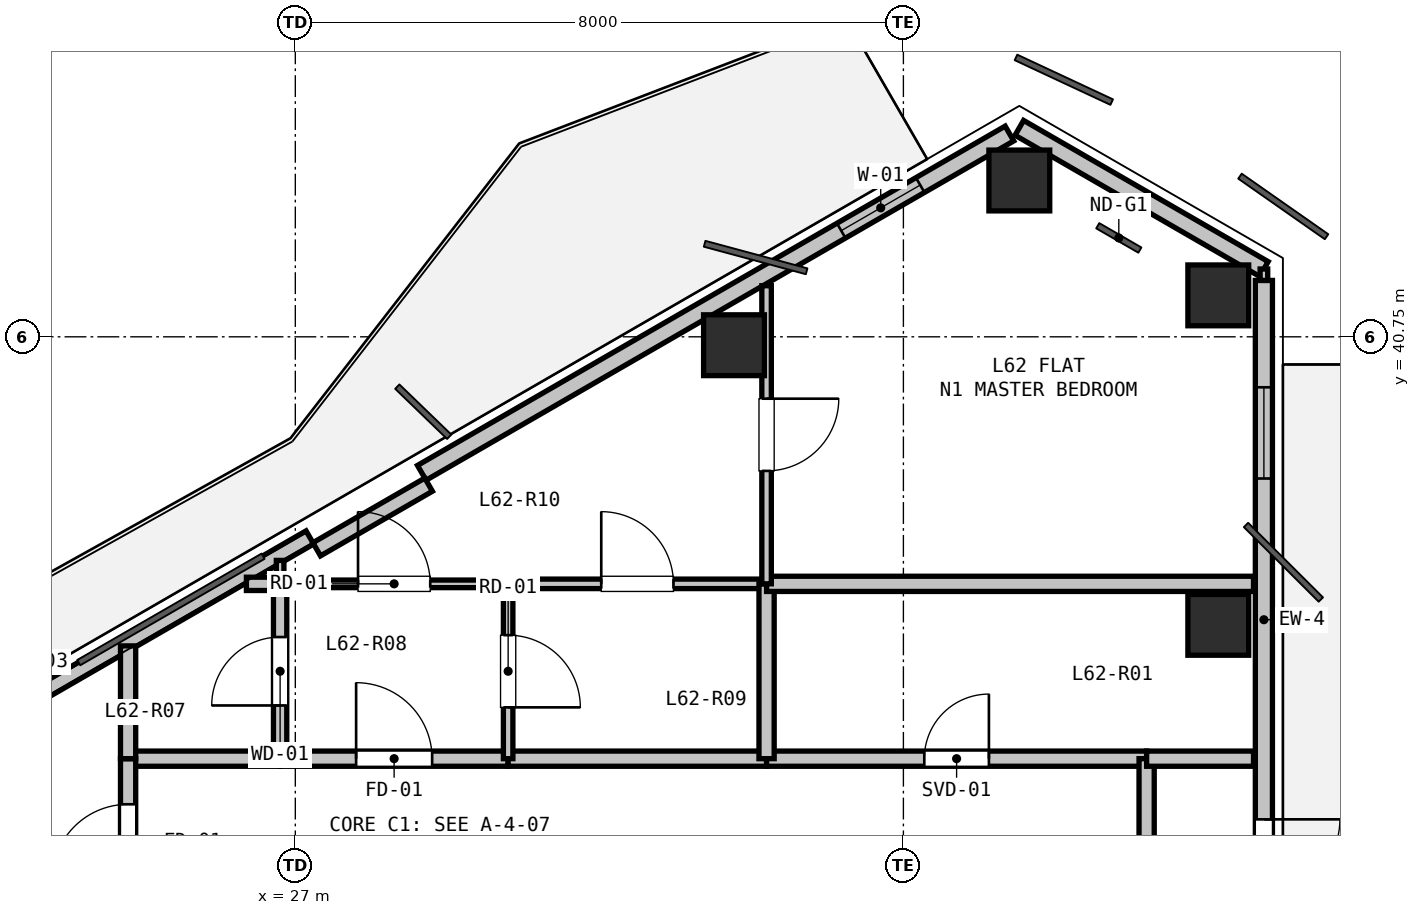
"""IFC4 building model, lengths in metres.
Left out: names, types, materials, properties, quantities, classifications, styles, units other than length and angle.
Written with IfcOpenShell. Run it as: python <this file> out.ifc"""

import sys

from ifc_helpers import new_model, si_unit, direction, frame, frame_2d, origin, origin_2d, place, context, subcontext, project, spatial, rectangle, hollow_rectangle, extrude, element, fill, save


model = new_model("IFC4")
c1 = context("Model", 3, precision=1e-05, world=origin(), true_north=direction((0.0, 1.0)))
c2 = subcontext(c1, "Body", "Model", "MODEL_VIEW")
j1 = project(units=[si_unit("LENGTHUNIT", "METRE"), si_unit("PLANEANGLEUNIT", "RADIAN")], contexts=[c1])
p1 = place(None, origin())
s1 = spatial("IfcSite", under=j1, at=p1, CompositionType="ELEMENT")
p2 = place(p1, origin())
s2 = spatial("IfcBuilding", under=s1, at=p2, CompositionType="ELEMENT")
p3 = place(p2, frame((0.0, 0.0, 223.2)))
s3 = spatial("IfcBuildingStorey", under=s2, at=p3, CompositionType="ELEMENT", Elevation=223.2)
for number, where, z_axis, x_axis in (
    (1, (32.771, 40.639, -0.22), (0.0, 0.0, 1.0), (1.0, 0.0, 0.0)),
    (2, (36.525, 42.807, -0.22), (0.0, 0.0, 1.0), (1.0, 0.0, 0.0)),
    (3, (39.143, 41.295, -0.22), (0.0, 0.0, 1.0), (1.0, 0.0, 0.0)),
    (4, (39.143, 36.961, -0.22), (0.0, 0.0, 1.0), (1.0, 0.0, 0.0)),
):
    element("IfcColumn", number, at=place(p3, frame(where, z_axis=z_axis, x_axis=x_axis)), inside=s3, PredefinedType="COLUMN", context=c2, shape_type="SweptSolid", body=[
        extrude(hollow_rectangle(XDim=0.8, YDim=0.8, WallThickness=0.025, at=origin_2d()), origin(), (0.0, 0.0, 1.0), 3.52),
    ])
p4 = place(p3, frame((36.525, 43.5, 0.0), z_axis=(0.0, 0.0, 1.0), x_axis=(0.866038962515, -0.499976514854, 0.0)))
e5 = element("IfcWall", 5, at=p4, inside=s3, PredefinedType="SOLIDWALL", context=c2, shape_type="SweptSolid", body=[
    extrude(rectangle(XDim=3.716, YDim=0.225, at=frame_2d((1.858, 0.0))), origin(), (0.0, 0.0, 1.0), 2.7),
])
p5 = place(p3, frame((20.066, 33.997, 0.0), z_axis=(0.0, 0.0, 1.0), x_axis=(0.866019557082, 0.500010126649, 0.0)))
e6 = element("IfcWall", 6, at=p5, inside=s3, PredefinedType="PARAPET", context=c2, shape_type="SweptSolid", body=[
    extrude(rectangle(XDim=8.228, YDim=0.2, at=frame_2d((4.114, 0.0))), origin(), (0.0, 0.0, 1.0), 0.2),
])
p6 = place(p3, frame((28.664, 38.96, 0.0), z_axis=(0.0, 0.0, 1.0), x_axis=(0.866026655105, 0.499997832642, 0.0)))
e7 = element("IfcWall", 7, at=p6, inside=s3, PredefinedType="SOLIDWALL", context=c2, shape_type="SweptSolid", body=[
    extrude(rectangle(XDim=8.928, YDim=0.225, at=frame_2d((4.464, 0.0))), origin(), (0.0, 0.0, 1.0), 2.7),
])
p7 = place(p6, frame((6.372, 0.0, 0.9)))
e8 = element("IfcOpeningElement", 8, at=p7, cuts=e7, PredefinedType="OPENING", context=c2, shape_type="SweptSolid", body=[
    extrude(rectangle(XDim=1.2, YDim=1.4, at=frame_2d((0.6, 0.7))), frame((0.0, 0.123, 0.0), z_axis=(0.0, -1.0, 0.0), x_axis=(1.0, 0.0, 0.0)), (0.0, 0.0, 1.0), 0.245),
])
p8 = place(p3, frame((27.281, 37.955, 0.0), z_axis=(0.0, 0.0, 1.0), x_axis=(0.866025371046, 0.500000056704, 0.0)))
e9 = element("IfcWall", 9, at=p8, inside=s3, PredefinedType="PARAPET", context=c2, shape_type="SweptSolid", body=[
    extrude(rectangle(XDim=1.7, YDim=0.2, at=frame_2d((0.85, 0.0))), origin(), (0.0, 0.0, 1.0), 2.7),
])
p9 = place(p3, frame((39.743, 41.492, 0.0), z_axis=(0.0, 0.0, 1.0), x_axis=(0.0, -1.0, 0.0)))
e10 = element("IfcWall", 10, at=p9, inside=s3, PredefinedType="SOLIDWALL", context=c2, shape_type="SweptSolid", body=[
    extrude(rectangle(XDim=8.928, YDim=0.225, at=frame_2d((4.464, 0.0))), origin(), (0.0, 0.0, 1.0), 2.7),
])
p10 = place(p9, frame((7.09, 0.0, 0.0)))
e11 = element("IfcOpeningElement", 11, at=p10, cuts=e10, PredefinedType="OPENING", context=c2, shape_type="SweptSolid", body=[
    extrude(rectangle(XDim=1.0, YDim=2.1, at=frame_2d((0.5, 1.05))), frame((0.0, 0.123, 0.0), z_axis=(0.0, -1.0, 0.0), x_axis=(1.0, 0.0, 0.0)), (0.0, 0.0, 1.0), 0.245),
])
p11 = place(p9, frame((1.406, 0.0, 0.9)))
e12 = element("IfcOpeningElement", 12, at=p11, cuts=e10, PredefinedType="OPENING", context=c2, shape_type="SweptSolid", body=[
    extrude(rectangle(XDim=1.2, YDim=1.4, at=frame_2d((0.6, 0.7))), frame((0.0, 0.123, 0.0), z_axis=(0.0, -1.0, 0.0), x_axis=(1.0, 0.0, 0.0)), (0.0, 0.0, 1.0), 0.245),
])
p12 = place(p3, frame((24.8, 35.2, 0.0), z_axis=(0.0, 0.0, 1.0), x_axis=(1.0, 0.0, 0.0)))
e13 = element("IfcWall", 13, at=p12, inside=s3, PredefinedType="PARTITIONING", context=c2, shape_type="SweptSolid", body=[
    extrude(rectangle(XDim=2.0, YDim=0.2, at=frame_2d((1.0, 0.0))), origin(), (0.0, 0.0, 1.0), 3.08),
])
p13 = place(p3, frame((26.8, 35.2, 0.0), z_axis=(0.0, 0.0, 1.0), x_axis=(1.0, 0.0, 0.0)))
e14 = element("IfcWall", 14, at=p13, inside=s3, PredefinedType="PARTITIONING", context=c2, shape_type="SweptSolid", body=[
    extrude(rectangle(XDim=3.0, YDim=0.2, at=frame_2d((1.5, 0.0))), origin(), (0.0, 0.0, 1.0), 3.08),
])
p14 = place(p13, frame((1.0, 0.0, 0.0)))
e15 = element("IfcOpeningElement", 15, at=p14, cuts=e14, PredefinedType="OPENING", context=c2, shape_type="SweptSolid", body=[
    extrude(rectangle(XDim=1.0, YDim=2.15, at=frame_2d((0.5, 1.075))), frame((0.0, 0.11, 0.0), z_axis=(0.0, -1.0, 0.0), x_axis=(1.0, 0.0, 0.0)), (0.0, 0.0, 1.0), 0.22),
])
p15 = place(p3, frame((29.8, 35.2, 0.0), z_axis=(0.0, 0.0, 1.0), x_axis=(1.0, 0.0, 0.0)))
e16 = element("IfcWall", 16, at=p15, inside=s3, PredefinedType="PARTITIONING", context=c2, shape_type="SweptSolid", body=[
    extrude(rectangle(XDim=3.4, YDim=0.2, at=frame_2d((1.7, 0.0))), origin(), (0.0, 0.0, 1.0), 3.08),
])
p16 = place(p3, frame((33.2, 35.2, 0.0), z_axis=(0.0, 0.0, 1.0), x_axis=(1.0, 0.0, 0.0)))
e17 = element("IfcWall", 17, at=p16, inside=s3, PredefinedType="PARTITIONING", context=c2, shape_type="SweptSolid", body=[
    extrude(rectangle(XDim=5.0, YDim=0.2, at=frame_2d((2.5, 0.0))), origin(), (0.0, 0.0, 1.0), 2.528),
])
p17 = place(p16, frame((2.075, 0.0, 0.0)))
e18 = element("IfcOpeningElement", 18, at=p17, cuts=e17, PredefinedType="OPENING", context=c2, shape_type="SweptSolid", body=[
    extrude(rectangle(XDim=0.85, YDim=2.1, at=frame_2d((0.425, 1.05))), frame((0.0, 0.11, 0.0), z_axis=(0.0, -1.0, 0.0), x_axis=(1.0, 0.0, 0.0)), (0.0, 0.0, 1.0), 0.22),
])
p18 = place(p3, frame((38.2, 35.2, 0.0), z_axis=(0.0, 0.0, 1.0), x_axis=(0.0, -1.0, 0.0)))
e19 = element("IfcWall", 19, at=p18, inside=s3, PredefinedType="PARTITIONING", context=c2, shape_type="SweptSolid", body=[
    extrude(rectangle(XDim=2.45, YDim=0.2, at=frame_2d((1.225, 0.0))), origin(), (0.0, 0.0, 1.0), 3.08),
])
p19 = place(p3, frame((24.8, 33.0, 0.0), z_axis=(0.0, 0.0, 1.0), x_axis=(0.0, 1.0, 0.0)))
e20 = element("IfcWall", 20, at=p19, inside=s3, PredefinedType="PARTITIONING", context=c2, shape_type="SweptSolid", body=[
    extrude(rectangle(XDim=2.2, YDim=0.2, at=frame_2d((1.1, 0.0))), origin(), (0.0, 0.0, 1.0), 2.605),
])
p20 = place(p19, frame((0.6, 0.0, 0.0)))
e21 = element("IfcOpeningElement", 21, at=p20, cuts=e20, PredefinedType="OPENING", context=c2, shape_type="SweptSolid", body=[
    extrude(rectangle(XDim=1.0, YDim=2.15, at=frame_2d((0.5, 1.075))), frame((0.0, 0.11, 0.0), z_axis=(0.0, -1.0, 0.0), x_axis=(1.0, 0.0, 0.0)), (0.0, 0.0, 1.0), 0.22),
])
p21 = place(p3, frame((26.8, 37.5, 0.0), z_axis=(0.0, 0.0, 1.0), x_axis=(1.0, 0.0, 0.0)))
e22 = element("IfcWall", 22, at=p21, inside=s3, PredefinedType="PARTITIONING", context=c2, shape_type="SweptSolid", body=[
    extrude(rectangle(XDim=3.0, YDim=0.1, at=frame_2d((1.5, 0.0))), origin(), (0.0, 0.0, 1.0), 2.365),
])
p22 = place(p21, frame((1.025, 0.0, 0.0)))
e23 = element("IfcOpeningElement", 23, at=p22, cuts=e22, PredefinedType="OPENING", context=c2, shape_type="SweptSolid", body=[
    extrude(rectangle(XDim=0.95, YDim=2.1, at=frame_2d((0.475, 1.05))), frame((0.0, 0.06, 0.0), z_axis=(0.0, -1.0, 0.0), x_axis=(1.0, 0.0, 0.0)), (0.0, 0.0, 1.0), 0.12),
])
p23 = place(p3, frame((29.8, 37.5, 0.0), z_axis=(0.0, 0.0, 1.0), x_axis=(0.0, -1.0, 0.0)))
e24 = element("IfcWall", 24, at=p23, inside=s3, PredefinedType="PARTITIONING", context=c2, shape_type="SweptSolid", body=[
    extrude(rectangle(XDim=2.3, YDim=0.125, at=frame_2d((1.15, 0.0))), origin(), (0.0, 0.0, 1.0), 3.08),
])
p24 = place(p23, frame((0.675, 0.0, 0.0)))
e25 = element("IfcOpeningElement", 25, at=p24, cuts=e24, PredefinedType="OPENING", context=c2, shape_type="SweptSolid", body=[
    extrude(rectangle(XDim=0.95, YDim=2.1, at=frame_2d((0.475, 1.05))), frame((0.0, 0.073, 0.0), z_axis=(0.0, -1.0, 0.0), x_axis=(1.0, 0.0, 0.0)), (0.0, 0.0, 1.0), 0.145),
])
p25 = place(p3, frame((26.8, 35.2, 0.0), z_axis=(0.0, 0.0, 1.0), x_axis=(0.0, 1.0, 0.0)))
e26 = element("IfcWall", 26, at=p25, inside=s3, PredefinedType="PLUMBINGWALL", context=c2, shape_type="SweptSolid", body=[
    extrude(rectangle(XDim=2.3, YDim=0.175, at=frame_2d((1.15, 0.0))), origin(), (0.0, 0.0, 1.0), 2.365),
])
p26 = place(p25, frame((0.7, 0.0, 0.0)))
e27 = element("IfcOpeningElement", 27, at=p26, cuts=e26, PredefinedType="OPENING", context=c2, shape_type="SweptSolid", body=[
    extrude(rectangle(XDim=0.9, YDim=2.1, at=frame_2d((0.45, 1.05))), frame((0.0, 0.097, 0.0), z_axis=(0.0, -1.0, 0.0), x_axis=(1.0, 0.0, 0.0)), (0.0, 0.0, 1.0), 0.195),
])
p27 = place(p3, frame((24.8, 35.2, 0.0), z_axis=(0.0, 0.0, 1.0), x_axis=(0.0, 1.0, 0.0)))
e28 = element("IfcWall", 28, at=p27, inside=s3, PredefinedType="PARTITIONING", context=c2, shape_type="SweptSolid", body=[
    extrude(rectangle(XDim=1.484, YDim=0.2, at=frame_2d((0.742, 0.0))), origin(), (0.0, 0.0, 1.0), 2.365),
])
p28 = place(p3, frame((26.357, 37.5, 0.0), z_axis=(0.0, 0.0, 1.0), x_axis=(1.0, 0.0, 0.0)))
e29 = element("IfcWall", 29, at=p28, inside=s3, PredefinedType="PLUMBINGWALL", context=c2, shape_type="SweptSolid", body=[
    extrude(rectangle(XDim=0.428, YDim=0.175, at=frame_2d((0.214, 0.0))), origin(), (0.0, 0.0, 1.0), 3.08),
])
p29 = place(p3, frame((29.8, 37.5, 0.0), z_axis=(0.0, 0.0, 1.0), x_axis=(1.0, 0.0, 0.0)))
e30 = element("IfcWall", 30, at=p29, inside=s3, PredefinedType="PARTITIONING", context=c2, shape_type="SweptSolid", body=[
    extrude(rectangle(XDim=3.4, YDim=0.125, at=frame_2d((1.7, 0.0))), origin(), (0.0, 0.0, 1.0), 3.08),
])
p30 = place(p29, frame((1.225, 0.0, 0.0)))
e31 = element("IfcOpeningElement", 31, at=p30, cuts=e30, PredefinedType="OPENING", context=c2, shape_type="SweptSolid", body=[
    extrude(rectangle(XDim=0.95, YDim=2.1, at=frame_2d((0.475, 1.05))), frame((0.0, 0.073, 0.0), z_axis=(0.0, -1.0, 0.0), x_axis=(1.0, 0.0, 0.0)), (0.0, 0.0, 1.0), 0.145),
])
p31 = place(p3, frame((33.2, 37.5, 0.0), z_axis=(0.0, 0.0, 1.0), x_axis=(0.0, -1.0, 0.0)))
e32 = element("IfcWall", 32, at=p31, inside=s3, PredefinedType="PARTITIONING", context=c2, shape_type="SweptSolid", body=[
    extrude(rectangle(XDim=2.3, YDim=0.2, at=frame_2d((1.15, 0.0))), origin(), (0.0, 0.0, 1.0), 3.08),
])
p32 = place(p3, frame((39.606, 35.2, 0.0), z_axis=(0.0, 0.0, 1.0), x_axis=(-1.0, 0.0, 0.0)))
e33 = element("IfcWall", 33, at=p32, inside=s3, PredefinedType="PARTITIONING", context=c2, shape_type="SweptSolid", body=[
    extrude(rectangle(XDim=1.406, YDim=0.2, at=frame_2d((0.703, 0.0))), origin(), (0.0, 0.0, 1.0), 2.365),
])
p33 = place(p3, frame((33.2, 37.5, 0.0), z_axis=(0.0, 0.0, 1.0), x_axis=(1.0, 0.0, 0.0)))
e34 = element("IfcWall", 34, at=p33, inside=s3, PredefinedType="PARTITIONING", context=c2, shape_type="SweptSolid", body=[
    extrude(rectangle(XDim=6.406, YDim=0.2, at=frame_2d((3.203, 0.0))), origin(), (0.0, 0.0, 1.0), 2.528),
])
p34 = place(p3, frame((26.8, 37.5, 0.0), z_axis=(0.0, 0.0, 1.0), x_axis=(0.0, 1.0, 0.0)))
e35 = element("IfcWall", 35, at=p34, inside=s3, PredefinedType="PARTITIONING", context=c2, shape_type="SweptSolid", body=[
    extrude(rectangle(XDim=0.308, YDim=0.1, at=frame_2d((0.154, 0.0))), origin(), (0.0, 0.0, 1.0), 3.08),
])
p35 = place(p3, frame((33.2, 41.422, 0.0), z_axis=(0.0, 0.0, 1.0), x_axis=(0.0, -1.0, 0.0)))
e36 = element("IfcWall", 36, at=p35, inside=s3, PredefinedType="PARTITIONING", context=c2, shape_type="SweptSolid", body=[
    extrude(rectangle(XDim=3.922, YDim=0.125, at=frame_2d((1.961, 0.0))), origin(), (0.0, 0.0, 1.0), 2.805),
])
p36 = place(p35, frame((1.486, 0.0, 0.0)))
e37 = element("IfcOpeningElement", 37, at=p36, cuts=e36, PredefinedType="OPENING", context=c2, shape_type="SweptSolid", body=[
    extrude(rectangle(XDim=0.95, YDim=2.1, at=frame_2d((0.475, 1.05))), frame((0.0, 0.073, 0.0), z_axis=(0.0, -1.0, 0.0), x_axis=(1.0, 0.0, 0.0)), (0.0, 0.0, 1.0), 0.145),
])
p37 = place(p3, frame((39.743, 41.642, 0.0), z_axis=(0.0, 0.0, 1.0), x_axis=(0.0, -1.0, 0.0)))
e38 = element("IfcWall", 38, at=p37, inside=s3, PredefinedType="PARTITIONING", context=c2, shape_type="SweptSolid", body=[
    extrude(rectangle(XDim=0.15, YDim=0.1, at=frame_2d((0.075, 0.0))), origin(), (0.0, 0.0, 1.0), 3.08),
])
p38 = place(p7, origin())
e39 = element("IfcWindow", 39, at=p38, inside=s3, PartitioningType="SINGLE_PANEL", PredefinedType="WINDOW", context=c2, shape_type="SweptSolid", body=[
    extrude(rectangle(XDim=1.2, YDim=1.4, at=frame_2d((0.6, 0.7))), frame((0.0, 0.03, 0.0), z_axis=(0.0, -1.0, 0.0), x_axis=(1.0, 0.0, 0.0)), (0.0, 0.0, 1.0), 0.06),
])
fill(e8, e39)
p39 = place(p10, origin())
e40 = element("IfcDoor", 40, at=p39, inside=s3, OperationType="SINGLE_SWING_LEFT", PredefinedType="DOOR", context=c2, shape_type="SweptSolid", body=[
    extrude(rectangle(XDim=1.0, YDim=2.1, at=frame_2d((0.5, 1.05))), frame((0.0, 0.025, 0.0), z_axis=(0.0, -1.0, 0.0), x_axis=(1.0, 0.0, 0.0)), (0.0, 0.0, 1.0), 0.05),
])
fill(e11, e40)
p40 = place(p11, origin())
e41 = element("IfcWindow", 41, at=p40, inside=s3, PartitioningType="SINGLE_PANEL", PredefinedType="WINDOW", context=c2, shape_type="SweptSolid", body=[
    extrude(rectangle(XDim=1.2, YDim=1.4, at=frame_2d((0.6, 0.7))), frame((0.0, 0.03, 0.0), z_axis=(0.0, -1.0, 0.0), x_axis=(1.0, 0.0, 0.0)), (0.0, 0.0, 1.0), 0.06),
])
fill(e12, e41)
p41 = place(p14, origin())
e42 = element("IfcDoor", 42, at=p41, inside=s3, OperationType="SINGLE_SWING_LEFT", PredefinedType="DOOR", context=c2, shape_type="SweptSolid", body=[
    extrude(rectangle(XDim=1.0, YDim=2.15, at=frame_2d((0.5, 1.075))), frame((0.0, 0.025, 0.0), z_axis=(0.0, -1.0, 0.0), x_axis=(1.0, 0.0, 0.0)), (0.0, 0.0, 1.0), 0.05),
])
fill(e15, e42)
p42 = place(p17, origin())
e43 = element("IfcDoor", 43, at=p42, inside=s3, OperationType="SINGLE_SWING_RIGHT", PredefinedType="DOOR", context=c2, shape_type="SweptSolid", body=[
    extrude(rectangle(XDim=0.85, YDim=2.1, at=frame_2d((0.425, 1.05))), frame((0.0, 0.025, 0.0), z_axis=(0.0, -1.0, 0.0), x_axis=(1.0, 0.0, 0.0)), (0.0, 0.0, 1.0), 0.05),
])
fill(e18, e43)
p43 = place(p20, origin())
e44 = element("IfcDoor", 44, at=p43, inside=s3, OperationType="SINGLE_SWING_LEFT", PredefinedType="DOOR", context=c2, shape_type="SweptSolid", body=[
    extrude(rectangle(XDim=1.0, YDim=2.15, at=frame_2d((0.5, 1.075))), frame((0.0, 0.025, 0.0), z_axis=(0.0, -1.0, 0.0), x_axis=(1.0, 0.0, 0.0)), (0.0, 0.0, 1.0), 0.05),
])
fill(e21, e44)
p44 = place(p26, origin())
e45 = element("IfcDoor", 45, at=p44, inside=s3, OperationType="SINGLE_SWING_LEFT", PredefinedType="DOOR", context=c2, shape_type="SweptSolid", body=[
    extrude(rectangle(XDim=0.9, YDim=2.1, at=frame_2d((0.45, 1.05))), frame((0.0, 0.025, 0.0), z_axis=(0.0, -1.0, 0.0), x_axis=(1.0, 0.0, 0.0)), (0.0, 0.0, 1.0), 0.05),
])
fill(e27, e45)
p45 = place(p24, origin())
e46 = element("IfcDoor", 46, at=p45, inside=s3, OperationType="SINGLE_SWING_RIGHT", PredefinedType="DOOR", context=c2, shape_type="SweptSolid", body=[
    extrude(rectangle(XDim=0.95, YDim=2.1, at=frame_2d((0.475, 1.05))), frame((0.0, 0.025, 0.0), z_axis=(0.0, -1.0, 0.0), x_axis=(1.0, 0.0, 0.0)), (0.0, 0.0, 1.0), 0.05),
])
fill(e25, e46)
p46 = place(p22, origin())
e47 = element("IfcDoor", 47, at=p46, inside=s3, OperationType="SINGLE_SWING_LEFT", PredefinedType="DOOR", context=c2, shape_type="SweptSolid", body=[
    extrude(rectangle(XDim=0.95, YDim=2.1, at=frame_2d((0.475, 1.05))), frame((0.0, 0.025, 0.0), z_axis=(0.0, -1.0, 0.0), x_axis=(1.0, 0.0, 0.0)), (0.0, 0.0, 1.0), 0.05),
])
fill(e23, e47)
p47 = place(p30, origin())
e48 = element("IfcDoor", 48, at=p47, inside=s3, OperationType="SINGLE_SWING_LEFT", PredefinedType="DOOR", context=c2, shape_type="SweptSolid", body=[
    extrude(rectangle(XDim=0.95, YDim=2.1, at=frame_2d((0.475, 1.05))), frame((0.0, 0.025, 0.0), z_axis=(0.0, -1.0, 0.0), x_axis=(1.0, 0.0, 0.0)), (0.0, 0.0, 1.0), 0.05),
])
fill(e31, e48)
p48 = place(p36, origin())
e49 = element("IfcDoor", 49, at=p48, inside=s3, OperationType="SINGLE_SWING_LEFT", PredefinedType="DOOR", context=c2, shape_type="SweptSolid", body=[
    extrude(rectangle(XDim=0.95, YDim=2.1, at=frame_2d((0.475, 1.05))), frame((0.0, 0.025, 0.0), z_axis=(0.0, -1.0, 0.0), x_axis=(1.0, 0.0, 0.0)), (0.0, 0.0, 1.0), 0.05),
])
fill(e37, e49)
save(model, sys.argv[1])
